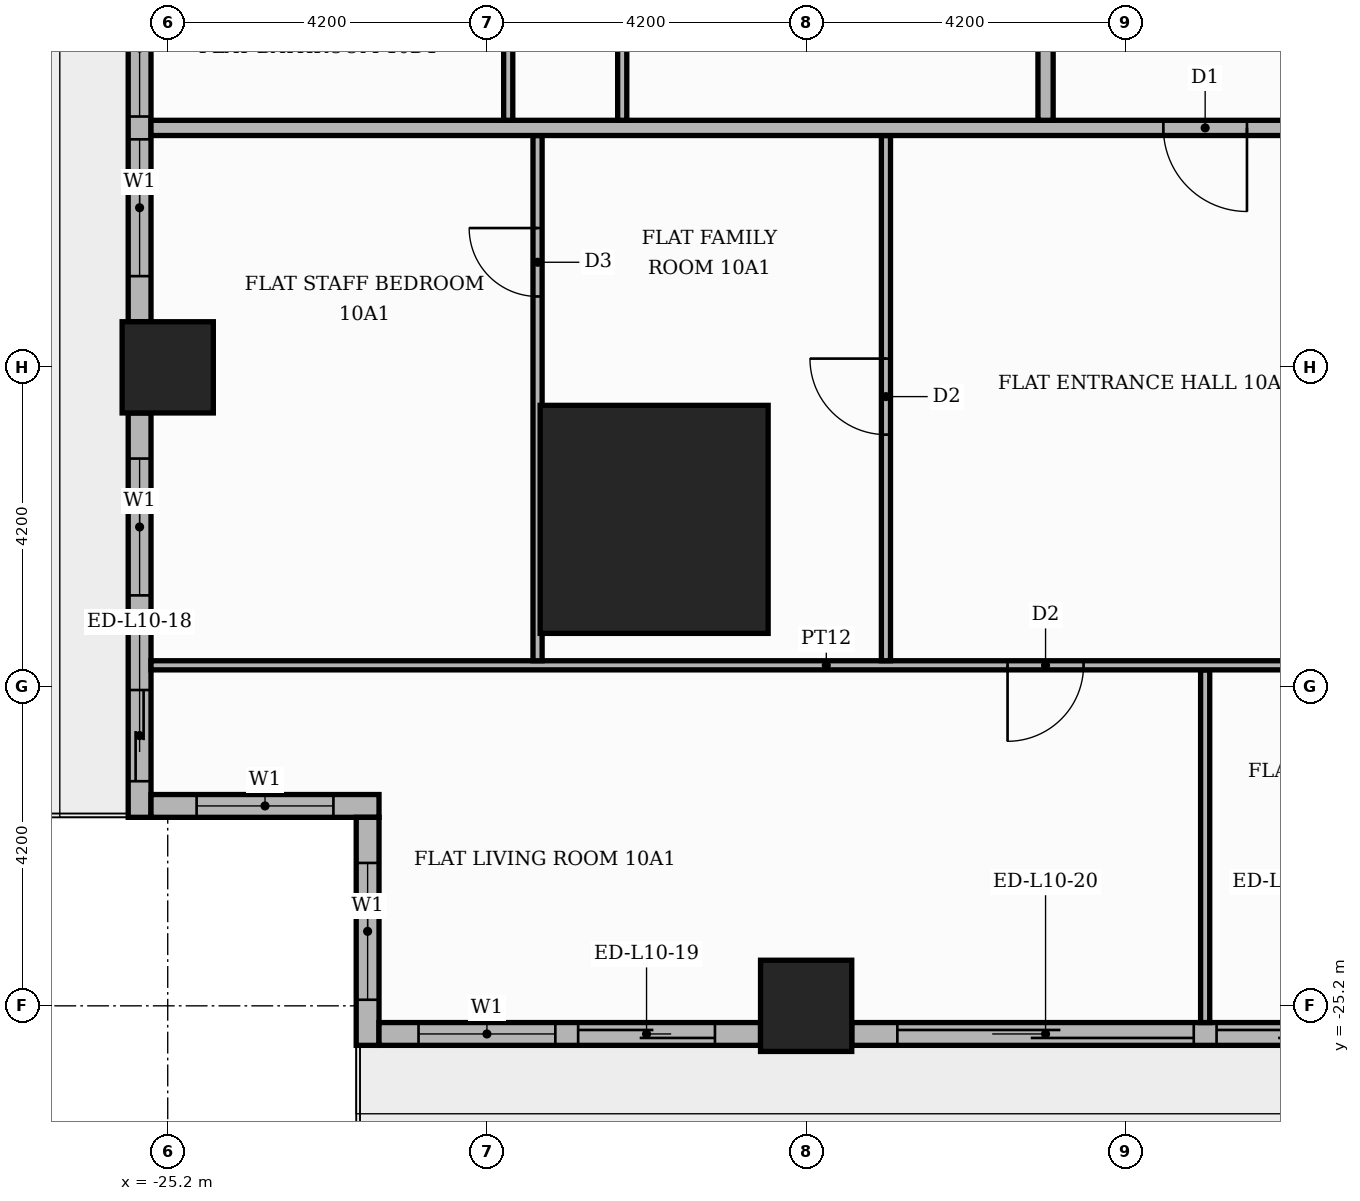
"""IFC4 building model, lengths in metres.
Left out: names, types, materials, properties, quantities, classifications, styles, units other than length and angle.
Written with IfcOpenShell. Run it as: python <this file> out.ifc"""

import sys

from ifc_helpers import new_model, si_unit, direction, frame, frame_2d, origin, origin_2d, place, context, subcontext, project, spatial, rectangle, extrude, element, fill, save


model = new_model("IFC4")
c1 = context("Model", 3, precision=1e-05, world=origin(), true_north=direction((0.0, 1.0)))
c2 = subcontext(c1, "Body", "Model", "MODEL_VIEW")
j1 = project(units=[si_unit("LENGTHUNIT", "METRE"), si_unit("PLANEANGLEUNIT", "RADIAN")], contexts=[c1])
p1 = place(None, origin())
s1 = spatial("IfcSite", under=j1, at=p1, CompositionType="ELEMENT")
p2 = place(p1, origin())
s2 = spatial("IfcBuilding", under=s1, at=p2, CompositionType="ELEMENT")
p3 = place(p2, frame((0.0, 0.0, 46.5)))
s3 = spatial("IfcBuildingStorey", under=s2, at=p3, CompositionType="ELEMENT", Elevation=46.5)
p4 = place(p3, frame((-18.8, -18.8, 0.0), z_axis=(0.0, 0.0, 1.0), x_axis=(1.0, 0.0, 0.0)))
e1 = element("IfcColumn", 1, at=p4, inside=s3, PredefinedType="COLUMN", context=c2, shape_type="SweptSolid", body=[
    extrude(rectangle(XDim=3.0, YDim=3.0, at=origin_2d()), origin(), (0.0, 0.0, 1.0), 3.9),
])
for number, where, z_axis, x_axis in (
    (2, (-16.8, -25.2, 0.0), (0.0, 0.0, 1.0), (1.0, 0.0, 0.0)),
    (3, (-25.2, -16.8, 0.0), (0.0, 0.0, 1.0), (1.0, 0.0, 0.0)),
):
    element("IfcColumn", number, at=place(p3, frame(where, z_axis=z_axis, x_axis=x_axis)), inside=s3, PredefinedType="COLUMN", context=c2, shape_type="SweptSolid", body=[
        extrude(rectangle(XDim=1.2, YDim=1.2, at=origin_2d()), origin(), (0.0, 0.0, 1.0), 3.9),
    ])
p5 = place(p3, frame((-25.57, -9.0, 0.0), z_axis=(0.0, 0.0, 1.0), x_axis=(0.0, -1.0, 0.0)))
e4 = element("IfcWall", 4, at=p5, inside=s3, PredefinedType="STANDARD", context=c2, shape_type="SweptSolid", body=[
    extrude(rectangle(XDim=7.2, YDim=0.3, at=frame_2d((3.6, 0.0))), origin(), (0.0, 0.0, 1.0), 3.48),
])
p6 = place(p5, frame((0.6, 0.0, 0.9)))
e5 = element("IfcOpeningElement", 5, at=p6, cuts=e4, PredefinedType="OPENING", context=c2, shape_type="SweptSolid", body=[
    extrude(rectangle(XDim=1.8, YDim=2.1, at=frame_2d((0.9, 1.05))), frame((0.0, 0.16, 0.0), z_axis=(0.0, -1.0, 0.0), x_axis=(1.0, 0.0, 0.0)), (0.0, 0.0, 1.0), 0.32),
])
p7 = place(p5, frame((2.7, 0.0, 0.9)))
e6 = element("IfcOpeningElement", 6, at=p7, cuts=e4, PredefinedType="OPENING", context=c2, shape_type="SweptSolid", body=[
    extrude(rectangle(XDim=1.8, YDim=2.1, at=frame_2d((0.9, 1.05))), frame((0.0, 0.16, 0.0), z_axis=(0.0, -1.0, 0.0), x_axis=(1.0, 0.0, 0.0)), (0.0, 0.0, 1.0), 0.32),
])
p8 = place(p5, frame((4.8, 0.0, 0.9)))
e7 = element("IfcOpeningElement", 7, at=p8, cuts=e4, PredefinedType="OPENING", context=c2, shape_type="SweptSolid", body=[
    extrude(rectangle(XDim=1.8, YDim=2.1, at=frame_2d((0.9, 1.05))), frame((0.0, 0.16, 0.0), z_axis=(0.0, -1.0, 0.0), x_axis=(1.0, 0.0, 0.0)), (0.0, 0.0, 1.0), 0.32),
])
p9 = place(p3, frame((-25.57, -17.4, 0.0), z_axis=(0.0, 0.0, 1.0), x_axis=(0.0, -1.0, 0.0)))
e8 = element("IfcWall", 8, at=p9, inside=s3, PredefinedType="STANDARD", context=c2, shape_type="SweptSolid", body=[
    extrude(rectangle(XDim=5.32, YDim=0.3, at=frame_2d((2.66, 0.0))), origin(), (0.0, 0.0, 1.0), 3.48),
])
p10 = place(p9, frame((0.6, 0.0, 0.9)))
e9 = element("IfcOpeningElement", 9, at=p10, cuts=e8, PredefinedType="OPENING", context=c2, shape_type="SweptSolid", body=[
    extrude(rectangle(XDim=1.8, YDim=2.1, at=frame_2d((0.9, 1.05))), frame((0.0, 0.16, 0.0), z_axis=(0.0, -1.0, 0.0), x_axis=(1.0, 0.0, 0.0)), (0.0, 0.0, 1.0), 0.32),
])
p11 = place(p9, frame((3.645, 0.0, 0.0)))
e10 = element("IfcOpeningElement", 10, at=p11, cuts=e8, PredefinedType="OPENING", context=c2, shape_type="SweptSolid", body=[
    extrude(rectangle(XDim=1.2, YDim=2.4, at=frame_2d((0.6, 1.2))), frame((0.0, 0.16, 0.0), z_axis=(0.0, -1.0, 0.0), x_axis=(1.0, 0.0, 0.0)), (0.0, 0.0, 1.0), 0.32),
])
p12 = place(p3, frame((-25.42, -22.57, 0.0), z_axis=(0.0, 0.0, 1.0), x_axis=(1.0, 0.0, 0.0)))
e11 = element("IfcWall", 11, at=p12, inside=s3, PredefinedType="STANDARD", context=c2, shape_type="SweptSolid", body=[
    extrude(rectangle(XDim=3.0, YDim=0.3, at=frame_2d((1.5, 0.0))), origin(), (0.0, 0.0, 1.0), 3.48),
])
p13 = place(p12, frame((0.6, 0.0, 0.9)))
e12 = element("IfcOpeningElement", 12, at=p13, cuts=e11, PredefinedType="OPENING", context=c2, shape_type="SweptSolid", body=[
    extrude(rectangle(XDim=1.8, YDim=2.1, at=frame_2d((0.9, 1.05))), frame((0.0, 0.16, 0.0), z_axis=(0.0, -1.0, 0.0), x_axis=(1.0, 0.0, 0.0)), (0.0, 0.0, 1.0), 0.32),
])
p14 = place(p3, frame((-22.57, -22.72, 0.0), z_axis=(0.0, 0.0, 1.0), x_axis=(0.0, -1.0, 0.0)))
e13 = element("IfcWall", 13, at=p14, inside=s3, PredefinedType="STANDARD", context=c2, shape_type="SweptSolid", body=[
    extrude(rectangle(XDim=3.0, YDim=0.3, at=frame_2d((1.5, 0.0))), origin(), (0.0, 0.0, 1.0), 3.48),
])
p15 = place(p14, frame((0.6, 0.0, 0.9)))
e14 = element("IfcOpeningElement", 14, at=p15, cuts=e13, PredefinedType="OPENING", context=c2, shape_type="SweptSolid", body=[
    extrude(rectangle(XDim=1.8, YDim=2.1, at=frame_2d((0.9, 1.05))), frame((0.0, 0.16, 0.0), z_axis=(0.0, -1.0, 0.0), x_axis=(1.0, 0.0, 0.0)), (0.0, 0.0, 1.0), 0.32),
])
p16 = place(p3, frame((-22.42, -25.57, 0.0), z_axis=(0.0, 0.0, 1.0), x_axis=(1.0, 0.0, 0.0)))
e15 = element("IfcWall", 15, at=p16, inside=s3, PredefinedType="STANDARD", context=c2, shape_type="SweptSolid", body=[
    extrude(rectangle(XDim=5.02, YDim=0.3, at=frame_2d((2.51, 0.0))), origin(), (0.0, 0.0, 1.0), 3.48),
])
p17 = place(p16, frame((0.52, 0.0, 0.9)))
e16 = element("IfcOpeningElement", 16, at=p17, cuts=e15, PredefinedType="OPENING", context=c2, shape_type="SweptSolid", body=[
    extrude(rectangle(XDim=1.8, YDim=2.1, at=frame_2d((0.9, 1.05))), frame((0.0, 0.16, 0.0), z_axis=(0.0, -1.0, 0.0), x_axis=(1.0, 0.0, 0.0)), (0.0, 0.0, 1.0), 0.32),
])
p18 = place(p16, frame((2.62, 0.0, 0.0)))
e17 = element("IfcOpeningElement", 17, at=p18, cuts=e15, PredefinedType="OPENING", context=c2, shape_type="SweptSolid", body=[
    extrude(rectangle(XDim=1.8, YDim=2.4, at=frame_2d((0.9, 1.2))), frame((0.0, 0.16, 0.0), z_axis=(0.0, -1.0, 0.0), x_axis=(1.0, 0.0, 0.0)), (0.0, 0.0, 1.0), 0.32),
])
p19 = place(p3, frame((-16.2, -25.57, 0.0), z_axis=(0.0, 0.0, 1.0), x_axis=(1.0, 0.0, 0.0)))
e18 = element("IfcWall", 18, at=p19, inside=s3, PredefinedType="STANDARD", context=c2, shape_type="SweptSolid", body=[
    extrude(rectangle(XDim=7.2, YDim=0.3, at=frame_2d((3.6, 0.0))), origin(), (0.0, 0.0, 1.0), 3.48),
])
p20 = place(p19, frame((0.6, 0.0, 0.0)))
e19 = element("IfcOpeningElement", 19, at=p20, cuts=e18, PredefinedType="OPENING", context=c2, shape_type="SweptSolid", body=[
    extrude(rectangle(XDim=3.9, YDim=2.4, at=frame_2d((1.95, 1.2))), frame((0.0, 0.16, 0.0), z_axis=(0.0, -1.0, 0.0), x_axis=(1.0, 0.0, 0.0)), (0.0, 0.0, 1.0), 0.32),
])
p21 = place(p19, frame((4.8, 0.0, 0.0)))
e20 = element("IfcOpeningElement", 20, at=p21, cuts=e18, PredefinedType="OPENING", context=c2, shape_type="SweptSolid", body=[
    extrude(rectangle(XDim=1.8, YDim=2.4, at=frame_2d((0.9, 1.2))), frame((0.0, 0.16, 0.0), z_axis=(0.0, -1.0, 0.0), x_axis=(1.0, 0.0, 0.0)), (0.0, 0.0, 1.0), 0.32),
])
p22 = place(p3, frame((-11.55, -25.42, 0.0), z_axis=(0.0, 0.0, 1.0), x_axis=(0.0, 1.0, 0.0)))
e21 = element("IfcWall", 21, at=p22, inside=s3, PredefinedType="PARTITIONING", context=c2, shape_type="SweptSolid", body=[
    extrude(rectangle(XDim=4.64, YDim=0.12, at=frame_2d((2.32, 0.0))), origin(), (0.0, 0.0, 1.0), 3.48),
])
p23 = place(p3, frame((-25.42, -20.72, 0.0), z_axis=(0.0, 0.0, 1.0), x_axis=(1.0, 0.0, 0.0)))
e22 = element("IfcWall", 22, at=p23, inside=s3, PredefinedType="PARTITIONING", context=c2, shape_type="SweptSolid", body=[
    extrude(rectangle(XDim=17.77, YDim=0.12, at=frame_2d((8.885, 0.0))), origin(), (0.0, 0.0, 1.0), 3.48),
])
p24 = place(p23, frame((11.27, 0.0, 0.0)))
e23 = element("IfcOpeningElement", 23, at=p24, cuts=e22, PredefinedType="OPENING", context=c2, shape_type="SweptSolid", body=[
    extrude(rectangle(XDim=1.0, YDim=2.1, at=frame_2d((0.5, 1.05))), frame((0.0, 0.07, 0.0), z_axis=(0.0, -1.0, 0.0), x_axis=(1.0, 0.0, 0.0)), (0.0, 0.0, 1.0), 0.14),
])
p25 = place(p23, frame((15.47, 0.0, 0.0)))
e24 = element("IfcOpeningElement", 24, at=p25, cuts=e22, PredefinedType="OPENING", context=c2, shape_type="SweptSolid", body=[
    extrude(rectangle(XDim=1.0, YDim=2.1, at=frame_2d((0.5, 1.05))), frame((0.0, 0.07, 0.0), z_axis=(0.0, -1.0, 0.0), x_axis=(1.0, 0.0, 0.0)), (0.0, 0.0, 1.0), 0.14),
])
p26 = place(p3, frame((-20.334, -20.66, 0.0), z_axis=(0.0, 0.0, 1.0), x_axis=(0.0, 1.0, 0.0)))
e25 = element("IfcWall", 25, at=p26, inside=s3, PredefinedType="PARTITIONING", context=c2, shape_type="SweptSolid", body=[
    extrude(rectangle(XDim=6.91, YDim=0.12, at=frame_2d((3.455, 0.0))), origin(), (0.0, 0.0, 1.0), 3.48),
])
p27 = place(p26, frame((4.792, 0.0, 0.0)))
e26 = element("IfcOpeningElement", 26, at=p27, cuts=e25, PredefinedType="OPENING", context=c2, shape_type="SweptSolid", body=[
    extrude(rectangle(XDim=0.9, YDim=2.1, at=frame_2d((0.45, 1.05))), frame((0.0, 0.07, 0.0), z_axis=(0.0, -1.0, 0.0), x_axis=(1.0, 0.0, 0.0)), (0.0, 0.0, 1.0), 0.14),
])
p28 = place(p3, frame((-15.75, -20.66, 0.0), z_axis=(0.0, 0.0, 1.0), x_axis=(0.0, 1.0, 0.0)))
e27 = element("IfcWall", 27, at=p28, inside=s3, PredefinedType="PARTITIONING", context=c2, shape_type="SweptSolid", body=[
    extrude(rectangle(XDim=6.91, YDim=0.12, at=frame_2d((3.455, 0.0))), origin(), (0.0, 0.0, 1.0), 3.48),
])
p29 = place(p28, frame((2.975, 0.0, 0.0)))
e28 = element("IfcOpeningElement", 28, at=p29, cuts=e27, PredefinedType="OPENING", context=c2, shape_type="SweptSolid", body=[
    extrude(rectangle(XDim=1.0, YDim=2.1, at=frame_2d((0.5, 1.05))), frame((0.0, 0.07, 0.0), z_axis=(0.0, -1.0, 0.0), x_axis=(1.0, 0.0, 0.0)), (0.0, 0.0, 1.0), 0.14),
])
p30 = place(p3, frame((-25.42, -13.65, 0.0), z_axis=(0.0, 0.0, 1.0), x_axis=(1.0, 0.0, 0.0)))
e29 = element("IfcWall", 29, at=p30, inside=s3, PredefinedType="PARTITIONING", context=c2, shape_type="SweptSolid", body=[
    extrude(rectangle(XDim=39.07, YDim=0.2, at=frame_2d((19.535, 0.0))), origin(), (0.0, 0.0, 1.0), 3.48),
])
p31 = place(p30, frame((13.32, 0.0, 0.0)))
e30 = element("IfcOpeningElement", 30, at=p31, cuts=e29, PredefinedType="OPENING", context=c2, shape_type="SweptSolid", body=[
    extrude(rectangle(XDim=1.1, YDim=2.4, at=frame_2d((0.55, 1.2))), frame((0.0, 0.11, 0.0), z_axis=(0.0, -1.0, 0.0), x_axis=(1.0, 0.0, 0.0)), (0.0, 0.0, 1.0), 0.22),
])
p32 = place(p30, frame((21.72, 0.0, 0.0)))
e31 = element("IfcOpeningElement", 31, at=p32, cuts=e29, PredefinedType="OPENING", context=c2, shape_type="SweptSolid", body=[
    extrude(rectangle(XDim=1.1, YDim=2.4, at=frame_2d((0.55, 1.2))), frame((0.0, 0.11, 0.0), z_axis=(0.0, -1.0, 0.0), x_axis=(1.0, 0.0, 0.0)), (0.0, 0.0, 1.0), 0.22),
])
p33 = place(p3, frame((-20.72, -13.55, 0.0), z_axis=(0.0, 0.0, 1.0), x_axis=(0.0, 1.0, 0.0)))
e32 = element("IfcWall", 32, at=p33, inside=s3, PredefinedType="PARTITIONING", context=c2, shape_type="SweptSolid", body=[
    extrude(rectangle(XDim=1.94, YDim=0.12, at=frame_2d((0.97, 0.0))), origin(), (0.0, 0.0, 1.0), 3.48),
])
p34 = place(p3, frame((-19.22, -13.55, 0.0), z_axis=(0.0, 0.0, 1.0), x_axis=(0.0, 1.0, 0.0)))
e33 = element("IfcWall", 33, at=p34, inside=s3, PredefinedType="PARTITIONING", context=c2, shape_type="SweptSolid", body=[
    extrude(rectangle(XDim=3.74, YDim=0.12, at=frame_2d((1.87, 0.0))), origin(), (0.0, 0.0, 1.0), 3.48),
])
p35 = place(p34, frame((1.4, 0.0, 0.0)))
e34 = element("IfcOpeningElement", 34, at=p35, cuts=e33, PredefinedType="OPENING", context=c2, shape_type="SweptSolid", body=[
    extrude(rectangle(XDim=0.9, YDim=2.1, at=frame_2d((0.45, 1.05))), frame((0.0, 0.07, 0.0), z_axis=(0.0, -1.0, 0.0), x_axis=(1.0, 0.0, 0.0)), (0.0, 0.0, 1.0), 0.14),
])
p36 = place(p3, frame((-13.65, -13.55, 0.0), z_axis=(0.0, 0.0, 1.0), x_axis=(0.0, 1.0, 0.0)))
e35 = element("IfcWall", 35, at=p36, inside=s3, PredefinedType="PARTITIONING", context=c2, shape_type="SweptSolid", body=[
    extrude(rectangle(XDim=27.1, YDim=0.2, at=frame_2d((13.55, 0.0))), origin(), (0.0, 0.0, 1.0), 3.48),
])
p37 = place(p36, frame((24.55, 0.0, 0.0)))
e36 = element("IfcOpeningElement", 36, at=p37, cuts=e35, PredefinedType="OPENING", context=c2, shape_type="SweptSolid", body=[
    extrude(rectangle(XDim=1.1, YDim=2.4, at=frame_2d((0.55, 1.2))), frame((0.0, 0.11, 0.0), z_axis=(0.0, -1.0, 0.0), x_axis=(1.0, 0.0, 0.0)), (0.0, 0.0, 1.0), 0.22),
])
p38 = place(p7, origin())
e37 = element("IfcWindow", 37, at=p38, inside=s3, PartitioningType="SINGLE_PANEL", PredefinedType="WINDOW", context=c2, shape_type="SweptSolid", body=[
    extrude(rectangle(XDim=1.8, YDim=2.1, at=frame_2d((0.9, 1.05))), frame((0.0, 0.03, 0.0), z_axis=(0.0, -1.0, 0.0), x_axis=(1.0, 0.0, 0.0)), (0.0, 0.0, 1.0), 0.06),
])
fill(e6, e37)
p39 = place(p8, origin())
e38 = element("IfcWindow", 38, at=p39, inside=s3, PartitioningType="SINGLE_PANEL", PredefinedType="WINDOW", context=c2, shape_type="SweptSolid", body=[
    extrude(rectangle(XDim=1.8, YDim=2.1, at=frame_2d((0.9, 1.05))), frame((0.0, 0.03, 0.0), z_axis=(0.0, -1.0, 0.0), x_axis=(1.0, 0.0, 0.0)), (0.0, 0.0, 1.0), 0.06),
])
fill(e7, e38)
p40 = place(p10, origin())
e39 = element("IfcWindow", 39, at=p40, inside=s3, PartitioningType="SINGLE_PANEL", PredefinedType="WINDOW", context=c2, shape_type="SweptSolid", body=[
    extrude(rectangle(XDim=1.8, YDim=2.1, at=frame_2d((0.9, 1.05))), frame((0.0, 0.03, 0.0), z_axis=(0.0, -1.0, 0.0), x_axis=(1.0, 0.0, 0.0)), (0.0, 0.0, 1.0), 0.06),
])
fill(e9, e39)
p41 = place(p11, origin())
e40 = element("IfcDoor", 40, at=p41, inside=s3, OperationType="SLIDING_TO_RIGHT", PredefinedType="DOOR", context=c2, shape_type="SweptSolid", body=[
    extrude(rectangle(XDim=1.2, YDim=2.4, at=frame_2d((0.6, 1.2))), frame((0.0, 0.025, 0.0), z_axis=(0.0, -1.0, 0.0), x_axis=(1.0, 0.0, 0.0)), (0.0, 0.0, 1.0), 0.05),
])
fill(e10, e40)
p42 = place(p13, origin())
e41 = element("IfcWindow", 41, at=p42, inside=s3, PartitioningType="SINGLE_PANEL", PredefinedType="WINDOW", context=c2, shape_type="SweptSolid", body=[
    extrude(rectangle(XDim=1.8, YDim=2.1, at=frame_2d((0.9, 1.05))), frame((0.0, 0.03, 0.0), z_axis=(0.0, -1.0, 0.0), x_axis=(1.0, 0.0, 0.0)), (0.0, 0.0, 1.0), 0.06),
])
fill(e12, e41)
p43 = place(p15, origin())
e42 = element("IfcWindow", 42, at=p43, inside=s3, PartitioningType="SINGLE_PANEL", PredefinedType="WINDOW", context=c2, shape_type="SweptSolid", body=[
    extrude(rectangle(XDim=1.8, YDim=2.1, at=frame_2d((0.9, 1.05))), frame((0.0, 0.03, 0.0), z_axis=(0.0, -1.0, 0.0), x_axis=(1.0, 0.0, 0.0)), (0.0, 0.0, 1.0), 0.06),
])
fill(e14, e42)
p44 = place(p17, origin())
e43 = element("IfcWindow", 43, at=p44, inside=s3, PartitioningType="SINGLE_PANEL", PredefinedType="WINDOW", context=c2, shape_type="SweptSolid", body=[
    extrude(rectangle(XDim=1.8, YDim=2.1, at=frame_2d((0.9, 1.05))), frame((0.0, 0.03, 0.0), z_axis=(0.0, -1.0, 0.0), x_axis=(1.0, 0.0, 0.0)), (0.0, 0.0, 1.0), 0.06),
])
fill(e16, e43)
p45 = place(p18, origin())
e44 = element("IfcDoor", 44, at=p45, inside=s3, OperationType="SLIDING_TO_RIGHT", PredefinedType="DOOR", context=c2, shape_type="SweptSolid", body=[
    extrude(rectangle(XDim=1.8, YDim=2.4, at=frame_2d((0.9, 1.2))), frame((0.0, 0.025, 0.0), z_axis=(0.0, -1.0, 0.0), x_axis=(1.0, 0.0, 0.0)), (0.0, 0.0, 1.0), 0.05),
])
fill(e17, e44)
p46 = place(p20, origin())
e45 = element("IfcDoor", 45, at=p46, inside=s3, OperationType="SLIDING_TO_LEFT", PredefinedType="DOOR", context=c2, shape_type="SweptSolid", body=[
    extrude(rectangle(XDim=3.9, YDim=2.4, at=frame_2d((1.95, 1.2))), frame((0.0, 0.025, 0.0), z_axis=(0.0, -1.0, 0.0), x_axis=(1.0, 0.0, 0.0)), (0.0, 0.0, 1.0), 0.05),
])
fill(e19, e45)
p47 = place(p21, origin())
e46 = element("IfcDoor", 46, at=p47, inside=s3, OperationType="SLIDING_TO_RIGHT", PredefinedType="DOOR", context=c2, shape_type="SweptSolid", body=[
    extrude(rectangle(XDim=1.8, YDim=2.4, at=frame_2d((0.9, 1.2))), frame((0.0, 0.025, 0.0), z_axis=(0.0, -1.0, 0.0), x_axis=(1.0, 0.0, 0.0)), (0.0, 0.0, 1.0), 0.05),
])
fill(e20, e46)
p48 = place(p31, frame((1.1, 0.0, 0.0), z_axis=(0.0, 0.0, 1.0), x_axis=(-1.0, 0.0, 0.0)))
e47 = element("IfcDoor", 47, at=p48, inside=s3, OperationType="SINGLE_SWING_RIGHT", PredefinedType="DOOR", context=c2, shape_type="SweptSolid", body=[
    extrude(rectangle(XDim=1.1, YDim=2.4, at=frame_2d((0.55, 1.2))), frame((0.0, 0.025, 0.0), z_axis=(0.0, -1.0, 0.0), x_axis=(1.0, 0.0, 0.0)), (0.0, 0.0, 1.0), 0.05),
])
fill(e30, e47)
p49 = place(p27, origin())
e48 = element("IfcDoor", 48, at=p49, inside=s3, OperationType="SINGLE_SWING_RIGHT", PredefinedType="DOOR", context=c2, shape_type="SweptSolid", body=[
    extrude(rectangle(XDim=0.9, YDim=2.1, at=frame_2d((0.45, 1.05))), frame((0.0, 0.025, 0.0), z_axis=(0.0, -1.0, 0.0), x_axis=(1.0, 0.0, 0.0)), (0.0, 0.0, 1.0), 0.05),
])
fill(e26, e48)
p50 = place(p29, origin())
e49 = element("IfcDoor", 49, at=p50, inside=s3, OperationType="SINGLE_SWING_RIGHT", PredefinedType="DOOR", context=c2, shape_type="SweptSolid", body=[
    extrude(rectangle(XDim=1.0, YDim=2.1, at=frame_2d((0.5, 1.05))), frame((0.0, 0.025, 0.0), z_axis=(0.0, -1.0, 0.0), x_axis=(1.0, 0.0, 0.0)), (0.0, 0.0, 1.0), 0.05),
])
fill(e28, e49)
p51 = place(p24, frame((1.0, 0.0, 0.0), z_axis=(0.0, 0.0, 1.0), x_axis=(-1.0, 0.0, 0.0)))
e50 = element("IfcDoor", 50, at=p51, inside=s3, OperationType="SINGLE_SWING_LEFT", PredefinedType="DOOR", context=c2, shape_type="SweptSolid", body=[
    extrude(rectangle(XDim=1.0, YDim=2.1, at=frame_2d((0.5, 1.05))), frame((0.0, 0.025, 0.0), z_axis=(0.0, -1.0, 0.0), x_axis=(1.0, 0.0, 0.0)), (0.0, 0.0, 1.0), 0.05),
])
fill(e23, e50)
save(model, sys.argv[1])
